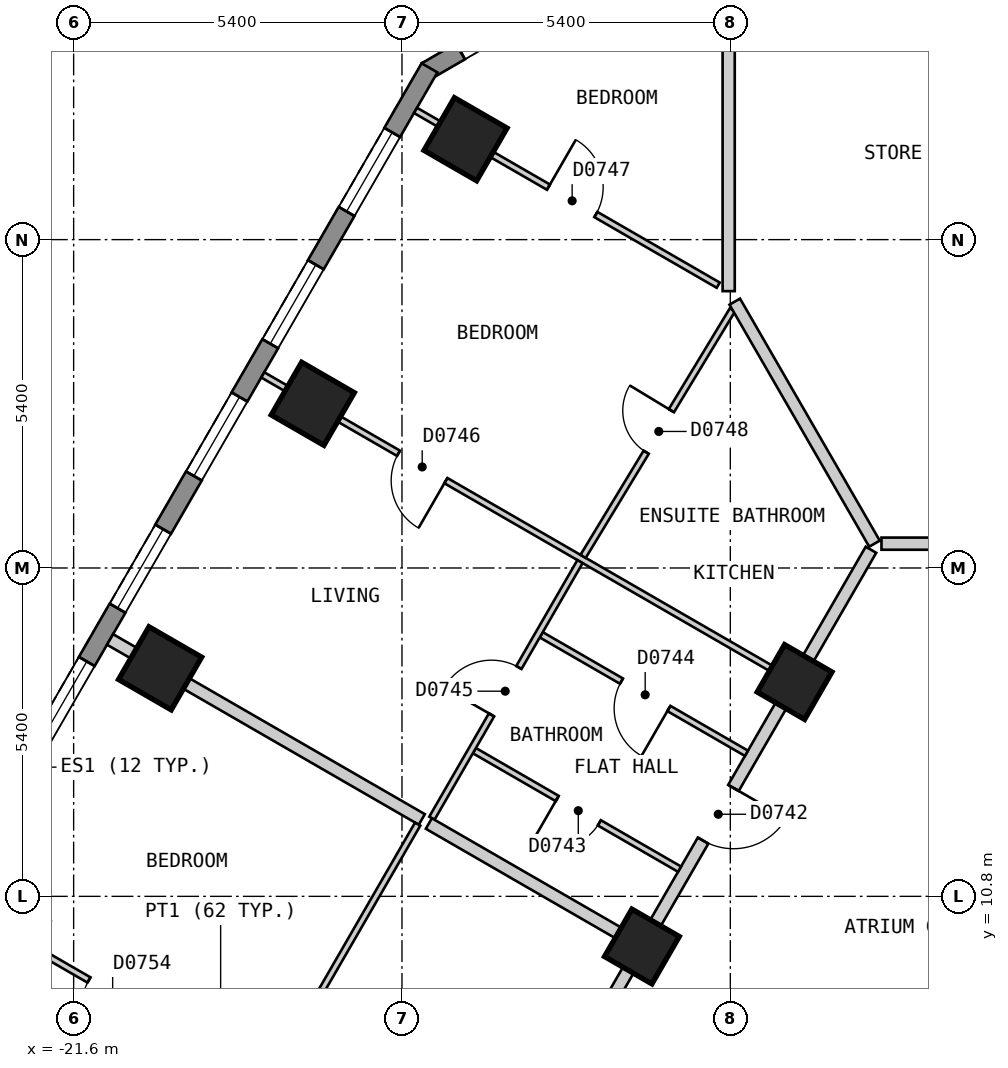
"""IFC4 building model, lengths in metres.
Left out: names, types, materials, properties, quantities, classifications, styles, units other than length and angle.
Written with IfcOpenShell. Run it as: python <this file> out.ifc"""

import sys

from ifc_helpers import new_model, si_unit, direction, frame, frame_2d, origin, origin_2d, place, context, subcontext, project, spatial, polyline, rectangle, outline, extrude, element, fill, save


model = new_model("IFC4")
c1 = context("Model", 3, precision=1e-05, world=origin(), true_north=direction((0.0, 1.0)))
c2 = subcontext(c1, "Body", "Model", "MODEL_VIEW")
j1 = project(units=[si_unit("LENGTHUNIT", "METRE"), si_unit("PLANEANGLEUNIT", "RADIAN")], contexts=[c1])
p1 = place(None, origin())
s1 = spatial("IfcSite", under=j1, at=p1, CompositionType="ELEMENT")
p2 = place(p1, origin())
s2 = spatial("IfcBuilding", under=s1, at=p2, CompositionType="ELEMENT")
p3 = place(p2, frame((0.0, 0.0, 99.0)))
s3 = spatial("IfcBuildingStorey", under=s2, at=p3, CompositionType="ELEMENT", Elevation=99.0)
for number, where, z_axis, x_axis in (
    (1, (-15.155, 23.251, 0.0), (0.0, 0.0, 1.0), (-0.5, -0.866, 0.0)),
    (2, (-17.667, 18.9, 0.0), (0.0, 0.0, 1.0), (-0.5, -0.866, 0.0)),
    (3, (-20.178, 14.55, 0.0), (0.0, 0.0, 1.0), (-0.5, -0.866, 0.0)),
):
    element("IfcColumn", number, at=place(p3, frame(where, z_axis=z_axis, x_axis=x_axis)), inside=s3, PredefinedType="COLUMN", context=c2, shape_type="SweptSolid", body=[
        extrude(rectangle(XDim=1.0, YDim=1.0, at=origin_2d()), origin(), (0.0, 0.0, 1.0), 3.0),
    ])
for number, where, z_axis, x_axis in (
    (4, (-9.743, 14.325, 0.0), (0.0, 0.0, 1.0), (-0.5, -0.866, 0.0)),
    (5, (-12.254, 9.975, 0.0), (0.0, 0.0, 1.0), (-0.5, -0.866, 0.0)),
):
    element("IfcColumn", number, at=place(p3, frame(where, z_axis=z_axis, x_axis=x_axis)), inside=s3, PredefinedType="COLUMN", context=c2, shape_type="SweptSolid", body=[
        extrude(rectangle(XDim=0.9, YDim=0.9, at=origin_2d()), origin(), (0.0, 0.0, 1.0), 3.0),
    ])
p4 = place(p3, frame((-11.472, 26.87, 0.0), z_axis=(0.0, 0.0, 1.0), x_axis=(-0.866022959057, -0.500004234368, 0.0)))
e6 = element("IfcWall", 6, at=p4, inside=s3, PredefinedType="SOLIDWALL", context=c2, shape_type="SweptSolid", body=[
    extrude(outline(polyline([(0.0, -0.15), (5.0, -0.15), (4.92, 0.15), (0.08, 0.15), (0.0, -0.15)])), origin(), (0.0, 0.0, 1.0), 2.7),
])
p5 = place(p4, frame((0.65, 0.0, 0.15)))
e7 = element("IfcOpeningElement", 7, at=p5, cuts=e6, PredefinedType="OPENING", context=c2, shape_type="SweptSolid", body=[
    extrude(rectangle(XDim=1.2, YDim=2.1, at=frame_2d((0.6, 1.05))), frame((0.0, 0.16, 0.0), z_axis=(0.0, -1.0, 0.0), x_axis=(1.0, 0.0, 0.0)), (0.0, 0.0, 1.0), 0.32),
])
p6 = place(p4, frame((3.149, 0.0, 0.15)))
e8 = element("IfcOpeningElement", 8, at=p6, cuts=e6, PredefinedType="OPENING", context=c2, shape_type="SweptSolid", body=[
    extrude(rectangle(XDim=1.2, YDim=2.1, at=frame_2d((0.6, 1.05))), frame((0.0, 0.16, 0.0), z_axis=(0.0, -1.0, 0.0), x_axis=(1.0, 0.0, 0.0)), (0.0, 0.0, 1.0), 0.32),
])
p7 = place(p3, frame((-15.747, 24.425, 0.0), z_axis=(0.0, 0.0, 1.0), x_axis=(-0.500027479704, -0.866009537788, 0.0)))
e9 = element("IfcWall", 9, at=p7, inside=s3, PredefinedType="SOLIDWALL", context=c2, shape_type="SweptSolid", body=[
    extrude(outline(polyline([(0.0, -0.15), (26.559, -0.15), (26.478, 0.15), (0.08, 0.15), (0.0, -0.15)])), origin(), (0.0, 0.0, 1.0), 2.7),
])
p8 = place(p7, frame((1.227, 0.0, 0.15)))
e10 = element("IfcOpeningElement", 10, at=p8, cuts=e9, PredefinedType="OPENING", context=c2, shape_type="SweptSolid", body=[
    extrude(rectangle(XDim=1.5, YDim=2.1, at=frame_2d((0.75, 1.05))), frame((0.0, 0.16, 0.0), z_axis=(0.0, -1.0, 0.0), x_axis=(1.0, 0.0, 0.0)), (0.0, 0.0, 1.0), 0.32),
])
p9 = place(p7, frame((3.739, 0.0, 0.15)))
e11 = element("IfcOpeningElement", 11, at=p9, cuts=e9, PredefinedType="OPENING", context=c2, shape_type="SweptSolid", body=[
    extrude(rectangle(XDim=1.5, YDim=2.1, at=frame_2d((0.75, 1.05))), frame((0.0, 0.16, 0.0), z_axis=(0.0, -1.0, 0.0), x_axis=(1.0, 0.0, 0.0)), (0.0, 0.0, 1.0), 0.32),
])
p10 = place(p7, frame((6.25, 0.0, 0.15)))
e12 = element("IfcOpeningElement", 12, at=p10, cuts=e9, PredefinedType="OPENING", context=c2, shape_type="SweptSolid", body=[
    extrude(rectangle(XDim=1.5, YDim=2.1, at=frame_2d((0.75, 1.05))), frame((0.0, 0.16, 0.0), z_axis=(0.0, -1.0, 0.0), x_axis=(1.0, 0.0, 0.0)), (0.0, 0.0, 1.0), 0.32),
])
p11 = place(p7, frame((8.761, 0.0, 0.15)))
e13 = element("IfcOpeningElement", 13, at=p11, cuts=e9, PredefinedType="OPENING", context=c2, shape_type="SweptSolid", body=[
    extrude(rectangle(XDim=1.5, YDim=2.1, at=frame_2d((0.75, 1.05))), frame((0.0, 0.16, 0.0), z_axis=(0.0, -1.0, 0.0), x_axis=(1.0, 0.0, 0.0)), (0.0, 0.0, 1.0), 0.32),
])
p12 = place(p7, frame((11.273, 0.0, 0.15)))
e14 = element("IfcOpeningElement", 14, at=p12, cuts=e9, PredefinedType="OPENING", context=c2, shape_type="SweptSolid", body=[
    extrude(rectangle(XDim=1.5, YDim=2.1, at=frame_2d((0.75, 1.05))), frame((0.0, 0.16, 0.0), z_axis=(0.0, -1.0, 0.0), x_axis=(1.0, 0.0, 0.0)), (0.0, 0.0, 1.0), 0.32),
])
p13 = place(p7, frame((13.785, 0.0, 0.15)))
e15 = element("IfcOpeningElement", 15, at=p13, cuts=e9, PredefinedType="OPENING", context=c2, shape_type="SweptSolid", body=[
    extrude(rectangle(XDim=1.5, YDim=2.1, at=frame_2d((0.75, 1.05))), frame((0.0, 0.16, 0.0), z_axis=(0.0, -1.0, 0.0), x_axis=(1.0, 0.0, 0.0)), (0.0, 0.0, 1.0), 0.32),
])
p14 = place(p7, frame((16.296, 0.0, 0.15)))
e16 = element("IfcOpeningElement", 16, at=p14, cuts=e9, PredefinedType="OPENING", context=c2, shape_type="SweptSolid", body=[
    extrude(rectangle(XDim=1.5, YDim=2.1, at=frame_2d((0.75, 1.05))), frame((0.0, 0.16, 0.0), z_axis=(0.0, -1.0, 0.0), x_axis=(1.0, 0.0, 0.0)), (0.0, 0.0, 1.0), 0.32),
])
p15 = place(p7, frame((18.807, 0.0, 0.15)))
e17 = element("IfcOpeningElement", 17, at=p15, cuts=e9, PredefinedType="OPENING", context=c2, shape_type="SweptSolid", body=[
    extrude(rectangle(XDim=1.5, YDim=2.1, at=frame_2d((0.75, 1.05))), frame((0.0, 0.16, 0.0), z_axis=(0.0, -1.0, 0.0), x_axis=(1.0, 0.0, 0.0)), (0.0, 0.0, 1.0), 0.32),
])
p16 = place(p7, frame((21.319, 0.0, 0.15)))
e18 = element("IfcOpeningElement", 18, at=p16, cuts=e9, PredefinedType="OPENING", context=c2, shape_type="SweptSolid", body=[
    extrude(rectangle(XDim=1.5, YDim=2.1, at=frame_2d((0.75, 1.05))), frame((0.0, 0.16, 0.0), z_axis=(0.0, -1.0, 0.0), x_axis=(1.0, 0.0, 0.0)), (0.0, 0.0, 1.0), 0.32),
])
p17 = place(p7, frame((23.831, 0.0, 0.15)))
e19 = element("IfcOpeningElement", 19, at=p17, cuts=e9, PredefinedType="OPENING", context=c2, shape_type="SweptSolid", body=[
    extrude(rectangle(XDim=1.5, YDim=2.1, at=frame_2d((0.75, 1.05))), frame((0.0, 0.16, 0.0), z_axis=(0.0, -1.0, 0.0), x_axis=(1.0, 0.0, 0.0)), (0.0, 0.0, 1.0), 0.32),
])
p18 = place(p3, frame((-8.314, 16.6, 0.0), z_axis=(0.0, 0.0, 1.0), x_axis=(1.0, 0.0, 0.0)))
e20 = element("IfcWall", 20, at=p18, inside=s3, PredefinedType="PARTITIONING", context=c2, shape_type="SweptSolid", body=[
    extrude(rectangle(XDim=2.309, YDim=0.2, at=frame_2d((1.155, 0.0))), origin(), (0.0, 0.0, 1.0), 2.7),
])
p19 = place(p18, frame((0.977, 0.0, 0.0)))
e21 = element("IfcOpeningElement", 21, at=p19, cuts=e20, PredefinedType="OPENING", context=c2, shape_type="SweptSolid", body=[
    extrude(rectangle(XDim=0.8, YDim=2.1, at=frame_2d((0.4, 1.05))), frame((0.0, 0.11, 0.0), z_axis=(0.0, -1.0, 0.0), x_axis=(1.0, 0.0, 0.0)), (0.0, 0.0, 1.0), 0.22),
])
p20 = place(p3, frame((-18.533, -0.901, 0.0), z_axis=(0.0, 0.0, 1.0), x_axis=(0.499981198768, 0.866036258409, 0.0)))
e22 = element("IfcWall", 22, at=p20, inside=s3, PredefinedType="PARTITIONING", context=c2, shape_type="SweptSolid", body=[
    extrude(rectangle(XDim=20.093, YDim=0.2, at=frame_2d((10.046, 0.0))), origin(), (0.0, 0.0, 1.0), 2.7),
])
p21 = place(p20, frame((14.57, 0.0, 0.0)))
e23 = element("IfcOpeningElement", 23, at=p21, cuts=e22, PredefinedType="OPENING", context=c2, shape_type="SweptSolid", body=[
    extrude(rectangle(XDim=1.0, YDim=2.1, at=frame_2d((0.5, 1.05))), frame((0.0, 0.11, 0.0), z_axis=(0.0, -1.0, 0.0), x_axis=(1.0, 0.0, 0.0)), (0.0, 0.0, 1.0), 0.22),
])
p22 = place(p20, frame((4.523, 0.0, 0.0)))
e24 = element("IfcOpeningElement", 24, at=p22, cuts=e22, PredefinedType="OPENING", context=c2, shape_type="SweptSolid", body=[
    extrude(rectangle(XDim=1.0, YDim=2.1, at=frame_2d((0.5, 1.05))), frame((0.0, 0.11, 0.0), z_axis=(0.0, -1.0, 0.0), x_axis=(1.0, 0.0, 0.0)), (0.0, 0.0, 1.0), 0.22),
])
p23 = place(p3, frame((-23.513, 10.675, 0.0), z_axis=(0.0, 0.0, 1.0), x_axis=(0.866041268327, -0.499972520799, 0.0)))
e25 = element("IfcWall", 25, at=p23, inside=s3, PredefinedType="PARTITIONING", context=c2, shape_type="SweptSolid", body=[
    extrude(rectangle(XDim=10.0, YDim=0.1, at=frame_2d((5.0, 0.0))), origin(), (0.0, 0.0, 1.0), 2.7),
])
p24 = place(p23, frame((7.55, 0.0, 0.0)))
e26 = element("IfcOpeningElement", 26, at=p24, cuts=e25, PredefinedType="OPENING", context=c2, shape_type="SweptSolid", body=[
    extrude(rectangle(XDim=0.9, YDim=2.1, at=frame_2d((0.45, 1.05))), frame((0.0, 0.06, 0.0), z_axis=(0.0, -1.0, 0.0), x_axis=(1.0, 0.0, 0.0)), (0.0, 0.0, 1.0), 0.12),
])
p25 = place(p23, frame((2.5, 0.0, 0.0)))
e27 = element("IfcOpeningElement", 27, at=p25, cuts=e25, PredefinedType="OPENING", context=c2, shape_type="SweptSolid", body=[
    extrude(rectangle(XDim=0.9, YDim=2.1, at=frame_2d((0.45, 1.05))), frame((0.0, 0.06, 0.0), z_axis=(0.0, -1.0, 0.0), x_axis=(1.0, 0.0, 0.0)), (0.0, 0.0, 1.0), 0.12),
])
p26 = place(p3, frame((-15.009, 13.196, 0.0), z_axis=(0.0, 0.0, 1.0), x_axis=(0.865916335424, -0.500188864377, 0.0)))
e28 = element("IfcWall", 28, at=p26, inside=s3, PredefinedType="PARTITIONING", context=c2, shape_type="SweptSolid", body=[
    extrude(rectangle(XDim=3.896, YDim=0.1, at=frame_2d((1.948, 0.0))), origin(), (0.0, 0.0, 1.0), 2.7),
])
p27 = place(p26, frame((1.573, 0.0, 0.0)))
e29 = element("IfcOpeningElement", 29, at=p27, cuts=e28, PredefinedType="OPENING", context=c2, shape_type="SweptSolid", body=[
    extrude(rectangle(XDim=0.8, YDim=2.1, at=frame_2d((0.4, 1.05))), frame((0.0, 0.06, 0.0), z_axis=(0.0, -1.0, 0.0), x_axis=(1.0, 0.0, 0.0)), (0.0, 0.0, 1.0), 0.12),
])
p28 = place(p3, frame((-13.909, 15.101, 0.0), z_axis=(0.0, 0.0, 1.0), x_axis=(0.866024880635, -0.500000906121, 0.0)))
e30 = element("IfcWall", 30, at=p28, inside=s3, PredefinedType="PARTITIONING", context=c2, shape_type="SweptSolid", body=[
    extrude(rectangle(XDim=3.896, YDim=0.1, at=frame_2d((1.948, 0.0))), origin(), (0.0, 0.0, 1.0), 2.7),
])
p29 = place(p28, frame((1.523, 0.0, 0.0)))
e31 = element("IfcOpeningElement", 31, at=p29, cuts=e30, PredefinedType="OPENING", context=c2, shape_type="SweptSolid", body=[
    extrude(rectangle(XDim=0.9, YDim=2.1, at=frame_2d((0.45, 1.05))), frame((0.0, 0.06, 0.0), z_axis=(0.0, -1.0, 0.0), x_axis=(1.0, 0.0, 0.0)), (0.0, 0.0, 1.0), 0.12),
])
p30 = place(p3, frame((-18.489, 19.375, 0.0), z_axis=(0.0, 0.0, 1.0), x_axis=(0.866016855193, -0.500014806302, 0.0)))
e32 = element("IfcWall", 32, at=p30, inside=s3, PredefinedType="PARTITIONING", context=c2, shape_type="SweptSolid", body=[
    extrude(rectangle(XDim=10.0, YDim=0.1, at=frame_2d((5.0, 0.0))), origin(), (0.0, 0.0, 1.0), 2.7),
])
p31 = place(p30, frame((2.577, 0.0, 0.0)))
e33 = element("IfcOpeningElement", 33, at=p31, cuts=e32, PredefinedType="OPENING", context=c2, shape_type="SweptSolid", body=[
    extrude(rectangle(XDim=0.9, YDim=2.1, at=frame_2d((0.45, 1.05))), frame((0.0, 0.06, 0.0), z_axis=(0.0, -1.0, 0.0), x_axis=(1.0, 0.0, 0.0)), (0.0, 0.0, 1.0), 0.12),
])
p32 = place(p3, frame((-15.977, 23.725, 0.0), z_axis=(0.0, 0.0, 1.0), x_axis=(0.866028566888, -0.499994521305, 0.0)))
e34 = element("IfcWall", 34, at=p32, inside=s3, PredefinedType="PARTITIONING", context=c2, shape_type="SweptSolid", body=[
    extrude(rectangle(XDim=5.748, YDim=0.1, at=frame_2d((2.874, 0.0))), origin(), (0.0, 0.0, 1.0), 2.7),
])
p33 = place(p32, frame((2.524, 0.0, 0.0)))
e35 = element("IfcOpeningElement", 35, at=p33, cuts=e34, PredefinedType="OPENING", context=c2, shape_type="SweptSolid", body=[
    extrude(rectangle(XDim=0.9, YDim=2.1, at=frame_2d((0.45, 1.05))), frame((0.0, 0.06, 0.0), z_axis=(0.0, -1.0, 0.0), x_axis=(1.0, 0.0, 0.0)), (0.0, 0.0, 1.0), 0.12),
])
p34 = place(p3, frame((-13.221, 16.391, 0.0), z_axis=(0.0, 0.0, 1.0), x_axis=(0.518164725284, 0.855280841286, 0.0)))
e36 = element("IfcWall", 36, at=p34, inside=s3, PredefinedType="PARTITIONING", context=c2, shape_type="SweptSolid", body=[
    extrude(rectangle(XDim=4.74, YDim=0.1, at=frame_2d((2.37, 0.0))), origin(), (0.0, 0.0, 1.0), 2.7),
])
p35 = place(p34, frame((2.002, 0.0, 0.0)))
e37 = element("IfcOpeningElement", 37, at=p35, cuts=e36, PredefinedType="OPENING", context=c2, shape_type="SweptSolid", body=[
    extrude(rectangle(XDim=0.8, YDim=2.1, at=frame_2d((0.4, 1.05))), frame((0.0, 0.06, 0.0), z_axis=(0.0, -1.0, 0.0), x_axis=(1.0, 0.0, 0.0)), (0.0, 0.0, 1.0), 0.12),
])
p36 = place(p3, frame((-15.708, 12.085, 0.0), z_axis=(0.0, 0.0, 1.0), x_axis=(0.499943653708, 0.866057932887, 0.0)))
e38 = element("IfcWall", 38, at=p36, inside=s3, PredefinedType="PARTITIONING", context=c2, shape_type="SweptSolid", body=[
    extrude(rectangle(XDim=4.873, YDim=0.1, at=frame_2d((2.436, 0.0))), origin(), (0.0, 0.0, 1.0), 2.7),
])
p37 = place(p36, frame((1.962, 0.0, 0.0)))
e39 = element("IfcOpeningElement", 39, at=p37, cuts=e38, PredefinedType="OPENING", context=c2, shape_type="SweptSolid", body=[
    extrude(rectangle(XDim=0.9, YDim=2.1, at=frame_2d((0.45, 1.05))), frame((0.0, 0.06, 0.0), z_axis=(0.0, -1.0, 0.0), x_axis=(1.0, 0.0, 0.0)), (0.0, 0.0, 1.0), 0.12),
])
p38 = place(p3, frame((-10.727, 20.58, 0.0), z_axis=(0.0, 0.0, 1.0), x_axis=(0.500041272028, -0.866001574057, 0.0)))
e40 = element("IfcWall", 40, at=p38, inside=s3, PredefinedType="PARTITIONING", context=c2, shape_type="SweptSolid", body=[
    extrude(rectangle(XDim=4.596, YDim=0.2, at=frame_2d((2.298, 0.0))), origin(), (0.0, 0.0, 1.0), 2.7),
])
p39 = place(p3, frame((-21.001, 15.025, 0.0), z_axis=(0.0, 0.0, 1.0), x_axis=(0.866031754707, -0.499988999718, 0.0)))
e41 = element("IfcWall", 41, at=p39, inside=s3, PredefinedType="PARTITIONING", context=c2, shape_type="SweptSolid", body=[
    extrude(rectangle(XDim=5.92, YDim=0.2, at=frame_2d((2.96, 0.0))), origin(), (0.0, 0.0, 1.0), 2.7),
])
p40 = place(p3, frame((-15.758, 11.998, 0.0), z_axis=(0.0, 0.0, 1.0), x_axis=(0.865987741337, -0.5000652276, 0.0)))
e42 = element("IfcWall", 42, at=p40, inside=s3, PredefinedType="PARTITIONING", context=c2, shape_type="SweptSolid", body=[
    extrude(rectangle(XDim=3.946, YDim=0.2, at=frame_2d((1.973, 0.0))), origin(), (0.0, 0.0, 1.0), 2.7),
])
p41 = place(p3, frame((-10.827, 20.753, 0.0), z_axis=(0.0, 0.0, 1.0), x_axis=(0.0, 1.0, 0.0)))
e43 = element("IfcWall", 43, at=p41, inside=s3, PredefinedType="PARTITIONING", context=c2, shape_type="SweptSolid", body=[
    extrude(rectangle(XDim=5.947, YDim=0.2, at=frame_2d((2.974, 0.0))), origin(), (0.0, 0.0, 1.0), 2.7),
])
p42 = place(p3, frame((-18.403, 7.725, 0.0), z_axis=(0.0, 0.0, 1.0), x_axis=(0.499995794706, 0.866027831699, 0.0)))
e44 = element("IfcWall", 44, at=p42, inside=s3, PredefinedType="PARTITIONING", context=c2, shape_type="SweptSolid", body=[
    extrude(rectangle(XDim=4.922, YDim=0.1, at=frame_2d((2.461, 0.0))), origin(), (0.0, 0.0, 1.0), 2.7),
])
p43 = place(p6, origin())
e45 = element("IfcWindow", 45, at=p43, inside=s3, PartitioningType="SINGLE_PANEL", PredefinedType="WINDOW", context=c2, shape_type="SweptSolid", body=[
    extrude(rectangle(XDim=1.2, YDim=2.1, at=frame_2d((0.6, 1.05))), frame((0.0, 0.03, 0.0), z_axis=(0.0, -1.0, 0.0), x_axis=(1.0, 0.0, 0.0)), (0.0, 0.0, 1.0), 0.06),
])
fill(e8, e45)
p44 = place(p8, origin())
e46 = element("IfcWindow", 46, at=p44, inside=s3, PartitioningType="SINGLE_PANEL", PredefinedType="WINDOW", context=c2, shape_type="SweptSolid", body=[
    extrude(rectangle(XDim=1.5, YDim=2.1, at=frame_2d((0.75, 1.05))), frame((0.0, 0.03, 0.0), z_axis=(0.0, -1.0, 0.0), x_axis=(1.0, 0.0, 0.0)), (0.0, 0.0, 1.0), 0.06),
])
fill(e10, e46)
p45 = place(p9, origin())
e47 = element("IfcWindow", 47, at=p45, inside=s3, PartitioningType="SINGLE_PANEL", PredefinedType="WINDOW", context=c2, shape_type="SweptSolid", body=[
    extrude(rectangle(XDim=1.5, YDim=2.1, at=frame_2d((0.75, 1.05))), frame((0.0, 0.03, 0.0), z_axis=(0.0, -1.0, 0.0), x_axis=(1.0, 0.0, 0.0)), (0.0, 0.0, 1.0), 0.06),
])
fill(e11, e47)
p46 = place(p10, origin())
e48 = element("IfcWindow", 48, at=p46, inside=s3, PartitioningType="SINGLE_PANEL", PredefinedType="WINDOW", context=c2, shape_type="SweptSolid", body=[
    extrude(rectangle(XDim=1.5, YDim=2.1, at=frame_2d((0.75, 1.05))), frame((0.0, 0.03, 0.0), z_axis=(0.0, -1.0, 0.0), x_axis=(1.0, 0.0, 0.0)), (0.0, 0.0, 1.0), 0.06),
])
fill(e12, e48)
p47 = place(p11, origin())
e49 = element("IfcWindow", 49, at=p47, inside=s3, PartitioningType="SINGLE_PANEL", PredefinedType="WINDOW", context=c2, shape_type="SweptSolid", body=[
    extrude(rectangle(XDim=1.5, YDim=2.1, at=frame_2d((0.75, 1.05))), frame((0.0, 0.03, 0.0), z_axis=(0.0, -1.0, 0.0), x_axis=(1.0, 0.0, 0.0)), (0.0, 0.0, 1.0), 0.06),
])
fill(e13, e49)
p48 = place(p12, origin())
e50 = element("IfcWindow", 50, at=p48, inside=s3, PartitioningType="SINGLE_PANEL", PredefinedType="WINDOW", context=c2, shape_type="SweptSolid", body=[
    extrude(rectangle(XDim=1.5, YDim=2.1, at=frame_2d((0.75, 1.05))), frame((0.0, 0.03, 0.0), z_axis=(0.0, -1.0, 0.0), x_axis=(1.0, 0.0, 0.0)), (0.0, 0.0, 1.0), 0.06),
])
fill(e14, e50)
p49 = place(p21, origin())
e51 = element("IfcDoor", 51, at=p49, inside=s3, OperationType="SINGLE_SWING_RIGHT", PredefinedType="DOOR", context=c2, shape_type="SweptSolid", body=[
    extrude(rectangle(XDim=1.0, YDim=2.1, at=frame_2d((0.5, 1.05))), frame((0.0, 0.025, 0.0), z_axis=(0.0, -1.0, 0.0), x_axis=(1.0, 0.0, 0.0)), (0.0, 0.0, 1.0), 0.05),
])
fill(e23, e51)
p50 = place(p27, origin())
e52 = element("IfcDoor", 52, at=p50, inside=s3, OperationType="SINGLE_SWING_LEFT", PredefinedType="DOOR", context=c2, shape_type="SweptSolid", body=[
    extrude(rectangle(XDim=0.8, YDim=2.1, at=frame_2d((0.4, 1.05))), frame((0.0, 0.025, 0.0), z_axis=(0.0, -1.0, 0.0), x_axis=(1.0, 0.0, 0.0)), (0.0, 0.0, 1.0), 0.05),
])
fill(e29, e52)
p51 = place(p29, origin())
e53 = element("IfcDoor", 53, at=p51, inside=s3, OperationType="SINGLE_SWING_RIGHT", PredefinedType="DOOR", context=c2, shape_type="SweptSolid", body=[
    extrude(rectangle(XDim=0.9, YDim=2.1, at=frame_2d((0.45, 1.05))), frame((0.0, 0.025, 0.0), z_axis=(0.0, -1.0, 0.0), x_axis=(1.0, 0.0, 0.0)), (0.0, 0.0, 1.0), 0.05),
])
fill(e31, e53)
p52 = place(p37, origin())
e54 = element("IfcDoor", 54, at=p52, inside=s3, OperationType="SINGLE_SWING_LEFT", PredefinedType="DOOR", context=c2, shape_type="SweptSolid", body=[
    extrude(rectangle(XDim=0.9, YDim=2.1, at=frame_2d((0.45, 1.05))), frame((0.0, 0.025, 0.0), z_axis=(0.0, -1.0, 0.0), x_axis=(1.0, 0.0, 0.0)), (0.0, 0.0, 1.0), 0.05),
])
fill(e39, e54)
p53 = place(p31, origin())
e55 = element("IfcDoor", 55, at=p53, inside=s3, OperationType="SINGLE_SWING_RIGHT", PredefinedType="DOOR", context=c2, shape_type="SweptSolid", body=[
    extrude(rectangle(XDim=0.9, YDim=2.1, at=frame_2d((0.45, 1.05))), frame((0.0, 0.025, 0.0), z_axis=(0.0, -1.0, 0.0), x_axis=(1.0, 0.0, 0.0)), (0.0, 0.0, 1.0), 0.05),
])
fill(e33, e55)
p54 = place(p33, origin())
e56 = element("IfcDoor", 56, at=p54, inside=s3, OperationType="SINGLE_SWING_LEFT", PredefinedType="DOOR", context=c2, shape_type="SweptSolid", body=[
    extrude(rectangle(XDim=0.9, YDim=2.1, at=frame_2d((0.45, 1.05))), frame((0.0, 0.025, 0.0), z_axis=(0.0, -1.0, 0.0), x_axis=(1.0, 0.0, 0.0)), (0.0, 0.0, 1.0), 0.05),
])
fill(e35, e56)
p55 = place(p35, origin())
e57 = element("IfcDoor", 57, at=p55, inside=s3, OperationType="SINGLE_SWING_RIGHT", PredefinedType="DOOR", context=c2, shape_type="SweptSolid", body=[
    extrude(rectangle(XDim=0.8, YDim=2.1, at=frame_2d((0.4, 1.05))), frame((0.0, 0.025, 0.0), z_axis=(0.0, -1.0, 0.0), x_axis=(1.0, 0.0, 0.0)), (0.0, 0.0, 1.0), 0.05),
])
fill(e37, e57)
p56 = place(p25, origin())
e58 = element("IfcDoor", 58, at=p56, inside=s3, OperationType="SINGLE_SWING_RIGHT", PredefinedType="DOOR", context=c2, shape_type="SweptSolid", body=[
    extrude(rectangle(XDim=0.9, YDim=2.1, at=frame_2d((0.45, 1.05))), frame((0.0, 0.025, 0.0), z_axis=(0.0, -1.0, 0.0), x_axis=(1.0, 0.0, 0.0)), (0.0, 0.0, 1.0), 0.05),
])
fill(e27, e58)
save(model, sys.argv[1])
